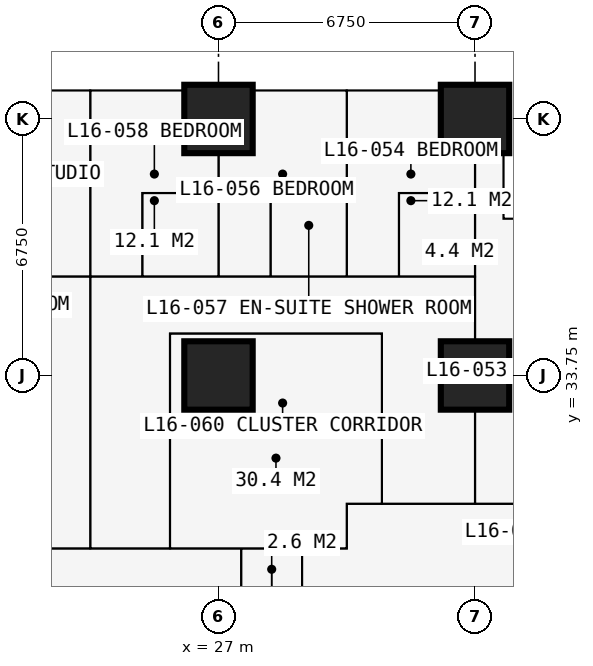
"""IFC4 building model, lengths in metres.
Left out: names, types, materials, properties, quantities, classifications, styles, units other than length and angle.
Written with IfcOpenShell. Run it as: python <this file> out.ifc"""

import sys

from ifc_helpers import new_model, si_unit, direction, frame, frame_2d, origin, origin_2d, place, context, subcontext, project, spatial, rectangle, extrude, element, fill, save


model = new_model("IFC4")
c1 = context("Model", 3, precision=1e-05, world=origin(), true_north=direction((0.0, 1.0)))
c2 = subcontext(c1, "Body", "Model", "MODEL_VIEW")
j1 = project(units=[si_unit("LENGTHUNIT", "METRE"), si_unit("PLANEANGLEUNIT", "RADIAN")], contexts=[c1])
p1 = place(None, origin())
s1 = spatial("IfcSite", under=j1, at=p1, CompositionType="ELEMENT")
p2 = place(p1, origin())
s2 = spatial("IfcBuilding", under=s1, at=p2, CompositionType="ELEMENT")
p3 = place(p2, frame((0.0, 0.0, 61.2)))
s3 = spatial("IfcBuildingStorey", under=s2, at=p3, CompositionType="ELEMENT", Elevation=61.2)
for number, where, z_axis, x_axis in (
    (1, (27.0, 33.75, 0.0), (0.0, 0.0, 1.0), (1.0, 0.0, 0.0)),
    (2, (27.0, 40.5, 0.0), (0.0, 0.0, 1.0), (1.0, 0.0, 0.0)),
    (3, (33.75, 33.75, 0.0), (0.0, 0.0, 1.0), (1.0, 0.0, 0.0)),
    (4, (33.75, 40.5, 0.0), (0.0, 0.0, 1.0), (1.0, 0.0, 0.0)),
):
    element("IfcColumn", number, at=place(p3, frame(where, z_axis=z_axis, x_axis=x_axis)), inside=s3, PredefinedType="COLUMN", context=c2, shape_type="SweptSolid", body=[
        extrude(rectangle(XDim=1.8, YDim=1.8, at=origin_2d()), origin(), (0.0, 0.0, 1.0), 3.6),
    ])
p4 = place(p3, frame((37.875, 37.875, 0.0), z_axis=(0.0, 0.0, 1.0), x_axis=(-1.0, 0.0, 0.0)))
e5 = element("IfcWall", 5, at=p4, inside=s3, PredefinedType="SOLIDWALL", context=c2, shape_type="SweptSolid", body=[
    extrude(rectangle(XDim=3.375, YDim=0.3, at=frame_2d((1.688, 0.0))), origin(), (0.0, 0.0, 1.0), 3.375),
])
p5 = place(p4, frame((0.788, 0.0, 0.6)))
e6 = element("IfcOpeningElement", 6, at=p5, cuts=e5, PredefinedType="OPENING", context=c2, shape_type="SweptSolid", body=[
    extrude(rectangle(XDim=1.8, YDim=2.1, at=frame_2d((0.9, 1.05))), frame((0.0, 0.16, 0.0), z_axis=(0.0, -1.0, 0.0), x_axis=(1.0, 0.0, 0.0)), (0.0, 0.0, 1.0), 0.32),
])
p6 = place(p3, frame((34.5, 37.875, 0.0), z_axis=(0.0, 0.0, 1.0), x_axis=(0.0, 1.0, 0.0)))
e7 = element("IfcWall", 7, at=p6, inside=s3, PredefinedType="SOLIDWALL", context=c2, shape_type="SweptSolid", body=[
    extrude(rectangle(XDim=3.375, YDim=0.3, at=frame_2d((1.688, 0.0))), origin(), (0.0, 0.0, 1.0), 3.375),
])
p7 = place(p6, frame((0.343, 0.0, 0.9)))
e8 = element("IfcOpeningElement", 8, at=p7, cuts=e7, PredefinedType="OPENING", context=c2, shape_type="SweptSolid", body=[
    extrude(rectangle(XDim=1.2, YDim=1.8, at=frame_2d((0.6, 0.9))), frame((0.0, 0.16, 0.0), z_axis=(0.0, -1.0, 0.0), x_axis=(1.0, 0.0, 0.0)), (0.0, 0.0, 1.0), 0.32),
])
p8 = place(p3, frame((10.125, 36.35, 0.0), z_axis=(0.0, 0.0, 1.0), x_axis=(1.0, 0.0, 0.0)))
e9 = element("IfcWall", 9, at=p8, inside=s3, PredefinedType="PARTITIONING", context=c2, shape_type="SweptSolid", body=[
    extrude(rectangle(XDim=23.625, YDim=0.15, at=frame_2d((11.812, 0.0))), origin(), (0.0, 0.0, 1.0), 3.375),
])
p9 = place(p8, frame((20.5, 0.0, 0.0)))
e10 = element("IfcOpeningElement", 10, at=p9, cuts=e9, PredefinedType="OPENING", context=c2, shape_type="SweptSolid", body=[
    extrude(rectangle(XDim=0.95, YDim=2.2, at=frame_2d((0.475, 1.1))), frame((0.0, 0.085, 0.0), z_axis=(0.0, -1.0, 0.0), x_axis=(1.0, 0.0, 0.0)), (0.0, 0.0, 1.0), 0.17),
])
p10 = place(p8, frame((17.125, 0.0, 0.0)))
e11 = element("IfcOpeningElement", 11, at=p10, cuts=e9, PredefinedType="OPENING", context=c2, shape_type="SweptSolid", body=[
    extrude(rectangle(XDim=0.95, YDim=2.2, at=frame_2d((0.475, 1.1))), frame((0.0, 0.085, 0.0), z_axis=(0.0, -1.0, 0.0), x_axis=(1.0, 0.0, 0.0)), (0.0, 0.0, 1.0), 0.17),
])
p11 = place(p8, frame((13.7, 0.0, 0.0)))
e12 = element("IfcOpeningElement", 12, at=p11, cuts=e9, PredefinedType="OPENING", context=c2, shape_type="SweptSolid", body=[
    extrude(rectangle(XDim=0.95, YDim=2.2, at=frame_2d((0.475, 1.1))), frame((0.0, 0.085, 0.0), z_axis=(0.0, -1.0, 0.0), x_axis=(1.0, 0.0, 0.0)), (0.0, 0.0, 1.0), 0.17),
])
p12 = place(p8, frame((4.2, 0.0, 0.0)))
e13 = element("IfcOpeningElement", 13, at=p12, cuts=e9, PredefinedType="OPENING", context=c2, shape_type="SweptSolid", body=[
    extrude(rectangle(XDim=0.95, YDim=2.2, at=frame_2d((0.475, 1.1))), frame((0.0, 0.085, 0.0), z_axis=(0.0, -1.0, 0.0), x_axis=(1.0, 0.0, 0.0)), (0.0, 0.0, 1.0), 0.17),
])
p13 = place(p8, frame((10.95, 0.0, 0.0)))
e14 = element("IfcOpeningElement", 14, at=p13, cuts=e9, PredefinedType="OPENING", context=c2, shape_type="SweptSolid", body=[
    extrude(rectangle(XDim=0.95, YDim=2.2, at=frame_2d((0.475, 1.1))), frame((0.0, 0.085, 0.0), z_axis=(0.0, -1.0, 0.0), x_axis=(1.0, 0.0, 0.0)), (0.0, 0.0, 1.0), 0.17),
])
p14 = place(p3, frame((11.3, 29.2, 0.0), z_axis=(0.0, 0.0, 1.0), x_axis=(1.0, 0.0, 0.0)))
e15 = element("IfcWall", 15, at=p14, inside=s3, PredefinedType="PARTITIONING", context=c2, shape_type="SweptSolid", body=[
    extrude(rectangle(XDim=19.075, YDim=0.15, at=frame_2d((9.538, 0.0))), origin(), (0.0, 0.0, 1.0), 3.375),
])
p15 = place(p14, frame((12.875, 0.0, 0.0)))
e16 = element("IfcOpeningElement", 16, at=p15, cuts=e15, PredefinedType="OPENING", context=c2, shape_type="SweptSolid", body=[
    extrude(rectangle(XDim=1.0, YDim=2.2, at=frame_2d((0.5, 1.1))), frame((0.0, 0.085, 0.0), z_axis=(0.0, -1.0, 0.0), x_axis=(1.0, 0.0, 0.0)), (0.0, 0.0, 1.0), 0.17),
])
p16 = place(p14, frame((10.438, 0.0, 0.0)))
e17 = element("IfcOpeningElement", 17, at=p16, cuts=e15, PredefinedType="OPENING", context=c2, shape_type="SweptSolid", body=[
    extrude(rectangle(XDim=1.0, YDim=2.2, at=frame_2d((0.5, 1.1))), frame((0.0, 0.085, 0.0), z_axis=(0.0, -1.0, 0.0), x_axis=(1.0, 0.0, 0.0)), (0.0, 0.0, 1.0), 0.17),
])
p17 = place(p14, frame((14.875, 0.0, 0.0)))
e18 = element("IfcOpeningElement", 18, at=p17, cuts=e15, PredefinedType="OPENING", context=c2, shape_type="SweptSolid", body=[
    extrude(rectangle(XDim=0.95, YDim=2.2, at=frame_2d((0.475, 1.1))), frame((0.0, 0.085, 0.0), z_axis=(0.0, -1.0, 0.0), x_axis=(1.0, 0.0, 0.0)), (0.0, 0.0, 1.0), 0.17),
])
p18 = place(p3, frame((23.625, 29.2, 0.0), z_axis=(0.0, 0.0, 1.0), x_axis=(0.0, 1.0, 0.0)))
e19 = element("IfcWall", 19, at=p18, inside=s3, PredefinedType="PARTITIONING", context=c2, shape_type="SweptSolid", body=[
    extrude(rectangle(XDim=12.034, YDim=0.15, at=frame_2d((6.017, 0.0))), origin(), (0.0, 0.0, 1.0), 3.375),
])
p19 = place(p3, frame((25.0, 36.35, 0.0), z_axis=(0.0, 0.0, 1.0), x_axis=(0.0, 1.0, 0.0)))
e20 = element("IfcWall", 20, at=p19, inside=s3, PredefinedType="PARTITIONING", context=c2, shape_type="SweptSolid", body=[
    extrude(rectangle(XDim=2.2, YDim=0.1, at=frame_2d((1.1, 0.0))), origin(), (0.0, 0.0, 1.0), 3.375),
])
p20 = place(p3, frame((25.0, 38.55, 0.0), z_axis=(0.0, 0.0, 1.0), x_axis=(1.0, 0.0, 0.0)))
e21 = element("IfcWall", 21, at=p20, inside=s3, PredefinedType="PARTITIONING", context=c2, shape_type="SweptSolid", body=[
    extrude(rectangle(XDim=2.0, YDim=0.1, at=frame_2d((1.0, 0.0))), origin(), (0.0, 0.0, 1.0), 3.375),
])
p21 = place(p3, frame((25.725, 29.2, 0.0), z_axis=(0.0, 0.0, 1.0), x_axis=(0.0, 1.0, 0.0)))
e22 = element("IfcWall", 22, at=p21, inside=s3, PredefinedType="PARTITIONING", context=c2, shape_type="SweptSolid", body=[
    extrude(rectangle(XDim=5.65, YDim=0.15, at=frame_2d((2.825, 0.0))), origin(), (0.0, 0.0, 1.0), 3.375),
])
p22 = place(p3, frame((25.725, 34.85, 0.0), z_axis=(0.0, 0.0, 1.0), x_axis=(1.0, 0.0, 0.0)))
e23 = element("IfcWall", 23, at=p22, inside=s3, PredefinedType="PARTITIONING", context=c2, shape_type="SweptSolid", body=[
    extrude(rectangle(XDim=5.575, YDim=0.15, at=frame_2d((2.788, 0.0))), origin(), (0.0, 0.0, 1.0), 3.375),
])
p23 = place(p3, frame((27.0, 36.35, 0.0), z_axis=(0.0, 0.0, 1.0), x_axis=(0.0, 1.0, 0.0)))
e24 = element("IfcWall", 24, at=p23, inside=s3, PredefinedType="PARTITIONING", context=c2, shape_type="SweptSolid", body=[
    extrude(rectangle(XDim=4.884, YDim=0.175, at=frame_2d((2.442, 0.0))), origin(), (0.0, 0.0, 1.0), 2.61),
])
p24 = place(p23, frame((0.65, 0.0, 0.0)))
e25 = element("IfcOpeningElement", 25, at=p24, cuts=e24, PredefinedType="OPENING", context=c2, shape_type="SweptSolid", body=[
    extrude(rectangle(XDim=0.9, YDim=2.2, at=frame_2d((0.45, 1.1))), frame((0.0, 0.097, 0.0), z_axis=(0.0, -1.0, 0.0), x_axis=(1.0, 0.0, 0.0)), (0.0, 0.0, 1.0), 0.195),
])
p25 = place(p3, frame((27.6, 27.6, 0.0), z_axis=(0.0, 0.0, 1.0), x_axis=(0.0, 1.0, 0.0)))
e26 = element("IfcWall", 26, at=p25, inside=s3, PredefinedType="PARTITIONING", context=c2, shape_type="SweptSolid", body=[
    extrude(rectangle(XDim=1.6, YDim=0.15, at=frame_2d((0.8, 0.0))), origin(), (0.0, 0.0, 1.0), 3.375),
])
p26 = place(p25, frame((0.3, 0.0, 0.0)))
e27 = element("IfcOpeningElement", 27, at=p26, cuts=e26, PredefinedType="OPENING", context=c2, shape_type="SweptSolid", body=[
    extrude(rectangle(XDim=0.95, YDim=2.2, at=frame_2d((0.475, 1.1))), frame((0.0, 0.085, 0.0), z_axis=(0.0, -1.0, 0.0), x_axis=(1.0, 0.0, 0.0)), (0.0, 0.0, 1.0), 0.17),
])
p27 = place(p3, frame((28.375, 36.35, 0.0), z_axis=(0.0, 0.0, 1.0), x_axis=(0.0, 1.0, 0.0)))
e28 = element("IfcWall", 28, at=p27, inside=s3, PredefinedType="PARTITIONING", context=c2, shape_type="SweptSolid", body=[
    extrude(rectangle(XDim=2.2, YDim=0.1, at=frame_2d((1.1, 0.0))), origin(), (0.0, 0.0, 1.0), 3.375),
])
p28 = place(p3, frame((28.375, 38.55, 0.0), z_axis=(0.0, 0.0, 1.0), x_axis=(1.0, 0.0, 0.0)))
e29 = element("IfcWall", 29, at=p28, inside=s3, PredefinedType="PARTITIONING", context=c2, shape_type="SweptSolid", body=[
    extrude(rectangle(XDim=2.0, YDim=0.1, at=frame_2d((1.0, 0.0))), origin(), (0.0, 0.0, 1.0), 3.375),
])
p29 = place(p3, frame((29.2, 11.3, 0.0), z_axis=(0.0, 0.0, 1.0), x_axis=(0.0, 1.0, 0.0)))
e30 = element("IfcWall", 30, at=p29, inside=s3, PredefinedType="PARTITIONING", context=c2, shape_type="SweptSolid", body=[
    extrude(rectangle(XDim=17.9, YDim=0.2, at=frame_2d((8.95, 0.0))), origin(), (0.0, 0.0, 1.0), 3.375),
])
p30 = place(p29, frame((8.35, 0.0, 0.0)))
e31 = element("IfcOpeningElement", 31, at=p30, cuts=e30, PredefinedType="OPENING", context=c2, shape_type="SweptSolid", body=[
    extrude(rectangle(XDim=1.2, YDim=2.2, at=frame_2d((0.6, 1.1))), frame((0.0, 0.11, 0.0), z_axis=(0.0, -1.0, 0.0), x_axis=(1.0, 0.0, 0.0)), (0.0, 0.0, 1.0), 0.22),
])
p31 = place(p3, frame((30.375, 29.2, 0.0), z_axis=(0.0, 0.0, 1.0), x_axis=(0.0, 1.0, 0.0)))
e32 = element("IfcWall", 32, at=p31, inside=s3, PredefinedType="PARTITIONING", context=c2, shape_type="SweptSolid", body=[
    extrude(rectangle(XDim=1.175, YDim=0.15, at=frame_2d((0.587, 0.0))), origin(), (0.0, 0.0, 1.0), 3.375),
])
p32 = place(p3, frame((30.375, 30.375, 0.0), z_axis=(0.0, 0.0, 1.0), x_axis=(1.0, 0.0, 0.0)))
e33 = element("IfcWall", 33, at=p32, inside=s3, PredefinedType="PARTITIONING", context=c2, shape_type="SweptSolid", body=[
    extrude(rectangle(XDim=10.859, YDim=0.15, at=frame_2d((5.429, 0.0))), origin(), (0.0, 0.0, 1.0), 3.375),
])
p33 = place(p3, frame((30.375, 36.35, 0.0), z_axis=(0.0, 0.0, 1.0), x_axis=(0.0, 1.0, 0.0)))
e34 = element("IfcWall", 34, at=p33, inside=s3, PredefinedType="PARTITIONING", context=c2, shape_type="SweptSolid", body=[
    extrude(rectangle(XDim=4.884, YDim=0.175, at=frame_2d((2.442, 0.0))), origin(), (0.0, 0.0, 1.0), 3.375),
])
p34 = place(p33, frame((0.65, 0.0, 0.0)))
e35 = element("IfcOpeningElement", 35, at=p34, cuts=e34, PredefinedType="OPENING", context=c2, shape_type="SweptSolid", body=[
    extrude(rectangle(XDim=0.9, YDim=2.2, at=frame_2d((0.45, 1.1))), frame((0.0, 0.097, 0.0), z_axis=(0.0, -1.0, 0.0), x_axis=(1.0, 0.0, 0.0)), (0.0, 0.0, 1.0), 0.195),
])
p35 = place(p3, frame((31.3, 30.375, 0.0), z_axis=(0.0, 0.0, 1.0), x_axis=(0.0, 1.0, 0.0)))
e36 = element("IfcWall", 36, at=p35, inside=s3, PredefinedType="PARTITIONING", context=c2, shape_type="SweptSolid", body=[
    extrude(rectangle(XDim=4.475, YDim=0.15, at=frame_2d((2.238, 0.0))), origin(), (0.0, 0.0, 1.0), 3.375),
])
p36 = place(p3, frame((31.75, 36.35, 0.0), z_axis=(0.0, 0.0, 1.0), x_axis=(0.0, 1.0, 0.0)))
e37 = element("IfcWall", 37, at=p36, inside=s3, PredefinedType="PARTITIONING", context=c2, shape_type="SweptSolid", body=[
    extrude(rectangle(XDim=2.2, YDim=0.1, at=frame_2d((1.1, 0.0))), origin(), (0.0, 0.0, 1.0), 3.375),
])
p37 = place(p36, frame((0.65, 0.0, 0.0)))
e38 = element("IfcOpeningElement", 38, at=p37, cuts=e37, PredefinedType="OPENING", context=c2, shape_type="SweptSolid", body=[
    extrude(rectangle(XDim=0.9, YDim=2.2, at=frame_2d((0.45, 1.1))), frame((0.0, 0.06, 0.0), z_axis=(0.0, -1.0, 0.0), x_axis=(1.0, 0.0, 0.0)), (0.0, 0.0, 1.0), 0.12),
])
p38 = place(p3, frame((31.75, 38.55, 0.0), z_axis=(0.0, 0.0, 1.0), x_axis=(1.0, 0.0, 0.0)))
e39 = element("IfcWall", 39, at=p38, inside=s3, PredefinedType="PARTITIONING", context=c2, shape_type="SweptSolid", body=[
    extrude(rectangle(XDim=2.0, YDim=0.1, at=frame_2d((1.0, 0.0))), origin(), (0.0, 0.0, 1.0), 3.375),
])
p39 = place(p3, frame((33.75, 30.375, 0.0), z_axis=(0.0, 0.0, 1.0), x_axis=(0.0, 1.0, 0.0)))
e40 = element("IfcWall", 40, at=p39, inside=s3, PredefinedType="PARTITIONING", context=c2, shape_type="SweptSolid", body=[
    extrude(rectangle(XDim=10.859, YDim=0.15, at=frame_2d((5.429, 0.0))), origin(), (0.0, 0.0, 1.0), 2.877),
])
p40 = place(p39, frame((1.45, 0.0, 0.0)))
e41 = element("IfcOpeningElement", 41, at=p40, cuts=e40, PredefinedType="OPENING", context=c2, shape_type="SweptSolid", body=[
    extrude(rectangle(XDim=1.0, YDim=2.2, at=frame_2d((0.5, 1.1))), frame((0.0, 0.085, 0.0), z_axis=(0.0, -1.0, 0.0), x_axis=(1.0, 0.0, 0.0)), (0.0, 0.0, 1.0), 0.17),
])
p41 = place(p7, origin())
e42 = element("IfcWindow", 42, at=p41, inside=s3, PartitioningType="SINGLE_PANEL", PredefinedType="WINDOW", context=c2, shape_type="SweptSolid", body=[
    extrude(rectangle(XDim=1.2, YDim=1.8, at=frame_2d((0.6, 0.9))), frame((0.0, 0.03, 0.0), z_axis=(0.0, -1.0, 0.0), x_axis=(1.0, 0.0, 0.0)), (0.0, 0.0, 1.0), 0.06),
])
fill(e8, e42)
p42 = place(p26, origin())
e43 = element("IfcDoor", 43, at=p42, inside=s3, OperationType="SINGLE_SWING_LEFT", PredefinedType="DOOR", context=c2, shape_type="SweptSolid", body=[
    extrude(rectangle(XDim=0.95, YDim=2.2, at=frame_2d((0.475, 1.1))), frame((0.0, 0.025, 0.0), z_axis=(0.0, -1.0, 0.0), x_axis=(1.0, 0.0, 0.0)), (0.0, 0.0, 1.0), 0.05),
])
fill(e27, e43)
p43 = place(p40, origin())
e44 = element("IfcDoor", 44, at=p43, inside=s3, OperationType="SINGLE_SWING_LEFT", PredefinedType="DOOR", context=c2, shape_type="SweptSolid", body=[
    extrude(rectangle(XDim=1.0, YDim=2.2, at=frame_2d((0.5, 1.1))), frame((0.0, 0.025, 0.0), z_axis=(0.0, -1.0, 0.0), x_axis=(1.0, 0.0, 0.0)), (0.0, 0.0, 1.0), 0.05),
])
fill(e41, e44)
p44 = place(p9, origin())
e45 = element("IfcDoor", 45, at=p44, inside=s3, OperationType="SINGLE_SWING_LEFT", PredefinedType="DOOR", context=c2, shape_type="SweptSolid", body=[
    extrude(rectangle(XDim=0.95, YDim=2.2, at=frame_2d((0.475, 1.1))), frame((0.0, 0.025, 0.0), z_axis=(0.0, -1.0, 0.0), x_axis=(1.0, 0.0, 0.0)), (0.0, 0.0, 1.0), 0.05),
])
fill(e10, e45)
p45 = place(p37, origin())
e46 = element("IfcDoor", 46, at=p45, inside=s3, OperationType="SINGLE_SWING_RIGHT", PredefinedType="DOOR", context=c2, shape_type="SweptSolid", body=[
    extrude(rectangle(XDim=0.9, YDim=2.2, at=frame_2d((0.45, 1.1))), frame((0.0, 0.025, 0.0), z_axis=(0.0, -1.0, 0.0), x_axis=(1.0, 0.0, 0.0)), (0.0, 0.0, 1.0), 0.05),
])
fill(e38, e46)
p46 = place(p10, origin())
e47 = element("IfcDoor", 47, at=p46, inside=s3, OperationType="SINGLE_SWING_LEFT", PredefinedType="DOOR", context=c2, shape_type="SweptSolid", body=[
    extrude(rectangle(XDim=0.95, YDim=2.2, at=frame_2d((0.475, 1.1))), frame((0.0, 0.025, 0.0), z_axis=(0.0, -1.0, 0.0), x_axis=(1.0, 0.0, 0.0)), (0.0, 0.0, 1.0), 0.05),
])
fill(e11, e47)
p47 = place(p34, origin())
e48 = element("IfcDoor", 48, at=p47, inside=s3, OperationType="SINGLE_SWING_RIGHT", PredefinedType="DOOR", context=c2, shape_type="SweptSolid", body=[
    extrude(rectangle(XDim=0.9, YDim=2.2, at=frame_2d((0.45, 1.1))), frame((0.0, 0.025, 0.0), z_axis=(0.0, -1.0, 0.0), x_axis=(1.0, 0.0, 0.0)), (0.0, 0.0, 1.0), 0.05),
])
fill(e35, e48)
p48 = place(p11, origin())
e49 = element("IfcDoor", 49, at=p48, inside=s3, OperationType="SINGLE_SWING_LEFT", PredefinedType="DOOR", context=c2, shape_type="SweptSolid", body=[
    extrude(rectangle(XDim=0.95, YDim=2.2, at=frame_2d((0.475, 1.1))), frame((0.0, 0.025, 0.0), z_axis=(0.0, -1.0, 0.0), x_axis=(1.0, 0.0, 0.0)), (0.0, 0.0, 1.0), 0.05),
])
fill(e12, e49)
p49 = place(p24, origin())
e50 = element("IfcDoor", 50, at=p49, inside=s3, OperationType="SINGLE_SWING_RIGHT", PredefinedType="DOOR", context=c2, shape_type="SweptSolid", body=[
    extrude(rectangle(XDim=0.9, YDim=2.2, at=frame_2d((0.45, 1.1))), frame((0.0, 0.025, 0.0), z_axis=(0.0, -1.0, 0.0), x_axis=(1.0, 0.0, 0.0)), (0.0, 0.0, 1.0), 0.05),
])
fill(e25, e50)
p50 = place(p15, origin())
e51 = element("IfcDoor", 51, at=p50, inside=s3, OperationType="SINGLE_SWING_LEFT", PredefinedType="DOOR", context=c2, shape_type="SweptSolid", body=[
    extrude(rectangle(XDim=1.0, YDim=2.2, at=frame_2d((0.5, 1.1))), frame((0.0, 0.025, 0.0), z_axis=(0.0, -1.0, 0.0), x_axis=(1.0, 0.0, 0.0)), (0.0, 0.0, 1.0), 0.05),
])
fill(e16, e51)
p51 = place(p16, origin())
e52 = element("IfcDoor", 52, at=p51, inside=s3, OperationType="SINGLE_SWING_LEFT", PredefinedType="DOOR", context=c2, shape_type="SweptSolid", body=[
    extrude(rectangle(XDim=1.0, YDim=2.2, at=frame_2d((0.5, 1.1))), frame((0.0, 0.025, 0.0), z_axis=(0.0, -1.0, 0.0), x_axis=(1.0, 0.0, 0.0)), (0.0, 0.0, 1.0), 0.05),
])
fill(e17, e52)
p52 = place(p17, origin())
e53 = element("IfcDoor", 53, at=p52, inside=s3, OperationType="SINGLE_SWING_LEFT", PredefinedType="DOOR", context=c2, shape_type="SweptSolid", body=[
    extrude(rectangle(XDim=0.95, YDim=2.2, at=frame_2d((0.475, 1.1))), frame((0.0, 0.025, 0.0), z_axis=(0.0, -1.0, 0.0), x_axis=(1.0, 0.0, 0.0)), (0.0, 0.0, 1.0), 0.05),
])
fill(e18, e53)
save(model, sys.argv[1])
